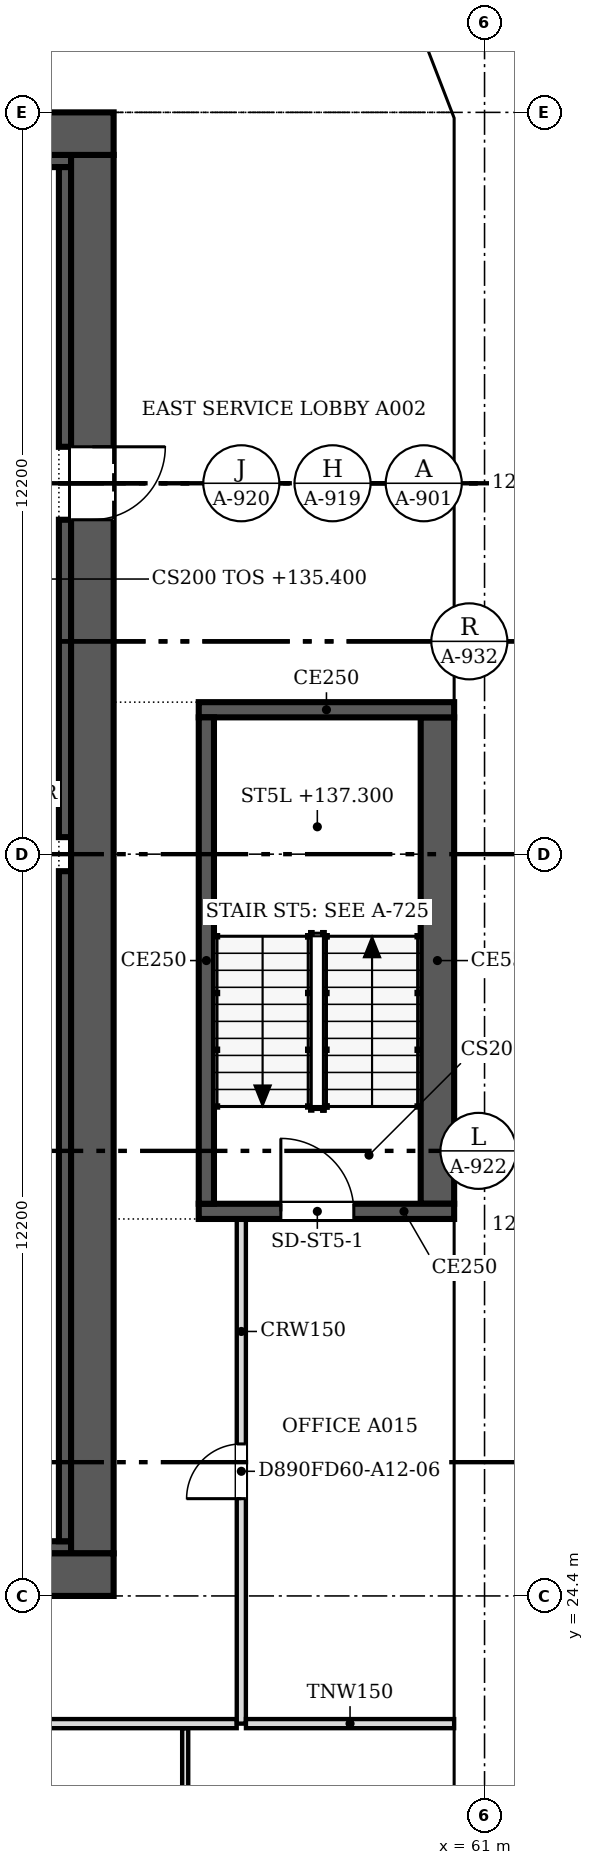
"""IFC4 building model, lengths in metres.
Left out: names, types, materials, properties, quantities, classifications, styles, units other than length and angle.
Written with IfcOpenShell. Run it as: python <this file> out.ifc"""

import sys

from ifc_helpers import new_model, si_unit, direction, frame, frame_2d, origin, place, context, subcontext, project, spatial, polyline, rectangle, outline, extrude, faceted_brep, source, transform, mapped, element, fill, save


model = new_model("IFC4")
c1 = context("Model", 3, precision=1e-05, world=origin(), true_north=direction((0.0, 1.0)))
c2 = subcontext(c1, "Body", "Model", "MODEL_VIEW")
j1 = project(units=[si_unit("LENGTHUNIT", "METRE"), si_unit("PLANEANGLEUNIT", "RADIAN")], contexts=[c1])
p1 = place(None, origin())
s1 = spatial("IfcSite", under=j1, at=p1, CompositionType="ELEMENT")
p2 = place(p1, origin())
s2 = spatial("IfcBuilding", under=s1, at=p2, CompositionType="ELEMENT")
p3 = place(p2, frame((0.0, 0.0, 135.4)))
s3 = spatial("IfcBuildingStorey", under=s2, at=p3, CompositionType="ELEMENT", Elevation=135.4)
m1 = source(origin(), c2, "Body", "Brep", [
    faceted_brep([(3.05, -0.25, 0.0), (6.1, -0.25, 3.8), (6.1, -0.25, 3.8), (3.05, -0.25, 7.6), (0.0, -0.25, 3.8), (0.0, 0.25, 3.8), (3.05, 0.25, 7.6), (6.1, 0.25, 3.8), (6.1, 0.25, 3.8), (3.05, 0.25, 0.0)], [[[0, 1, 2, 3, 4]], [[5, 6, 7, 8, 9]], [[9, 8, 1, 0]], [[7, 6, 3, 2]], [[6, 5, 4, 3]], [[5, 9, 0, 4]], [[1, 8, 7, 2]]]),
])
p4 = place(p3, frame((60.75, 18.3, -3.8), z_axis=(0.0, 0.0, 1.0), x_axis=(0.0, 1.0, 0.0)))
e1 = element("IfcWall", 1, at=p4, inside=s3, PredefinedType="SOLIDWALL", context=c2, shape_type="MappedRepresentation", body=[
    mapped(m1, transform((0.0, 0.0, 0.0), scale=1.0)),
])
m2 = source(origin(), c2, "Body", "SweptSolid", [
    extrude(outline(polyline([(3.05, 0.399), (5.78, 3.8), (3.05, 7.2), (0.321, 3.8), (3.05, 0.399)])), frame((0.0, 0.26, 0.0), z_axis=(0.0, -1.0, 0.0), x_axis=(1.0, 0.0, 0.0)), (0.0, 0.0, 1.0), 0.52),
])
p5 = place(p4, origin())
e2 = element("IfcOpeningElement", 2, at=p5, cuts=e1, PredefinedType="OPENING", context=c2, shape_type="MappedRepresentation", body=[
    mapped(m2, transform((0.0, 0.0, 0.0), scale=1.0)),
])
m3 = source(origin(), c2, "Body", "SweptSolid", [
    extrude(outline(polyline([(3.05, 0.0), (6.1, 3.8), (3.05, 7.6), (0.0, 3.8), (3.05, 0.0)])), frame((0.0, 0.25, 0.0), z_axis=(0.0, -1.0, 0.0), x_axis=(1.0, 0.0, 0.0)), (0.0, 0.0, 1.0), 0.5),
])
p6 = place(p3, frame((60.75, 24.4, -3.8), z_axis=(0.0, 0.0, 1.0), x_axis=(0.0, 1.0, 0.0)))
e3 = element("IfcWall", 3, at=p6, inside=s3, PredefinedType="SOLIDWALL", context=c2, shape_type="MappedRepresentation", body=[
    mapped(m3, transform((0.0, 0.0, 0.0), scale=1.0)),
])
p7 = place(p6, origin())
e4 = element("IfcOpeningElement", 4, at=p7, cuts=e3, PredefinedType="OPENING", context=c2, shape_type="MappedRepresentation", body=[
    mapped(m2, transform((0.0, 0.0, 0.0), scale=1.0)),
])
p8 = place(p3, frame((60.75, 30.5, -3.8), z_axis=(0.0, 0.0, 1.0), x_axis=(0.0, 1.0, 0.0)))
e5 = element("IfcWall", 5, at=p8, inside=s3, PredefinedType="SOLIDWALL", context=c2, shape_type="MappedRepresentation", body=[
    mapped(m3, transform((0.0, 0.0, 0.0), scale=1.0)),
])
p9 = place(p8, origin())
e6 = element("IfcOpeningElement", 6, at=p9, cuts=e5, PredefinedType="OPENING", context=c2, shape_type="MappedRepresentation", body=[
    mapped(m2, transform((0.0, 0.0, 0.0), scale=1.0)),
])
p10 = place(p3, frame((60.75, 36.6, -3.8), z_axis=(0.0, 0.0, 1.0), x_axis=(0.0, 1.0, 0.0)))
e7 = element("IfcWall", 7, at=p10, inside=s3, PredefinedType="SOLIDWALL", context=c2, shape_type="MappedRepresentation", body=[
    mapped(m1, transform((0.0, 0.0, 0.0), scale=1.0)),
])
p11 = place(p10, origin())
e8 = element("IfcOpeningElement", 8, at=p11, cuts=e7, PredefinedType="OPENING", context=c2, shape_type="MappedRepresentation", body=[
    mapped(m2, transform((0.0, 0.0, 0.0), scale=1.0)),
])
m4 = source(origin(), c2, "Body", "Brep", [
    faceted_brep([(3.05, -0.25, 0.0), (6.053, -0.25, 3.8), (3.05, -0.25, 7.6), (0.0, -0.25, 3.8), (0.0, 0.25, 3.8), (3.05, 0.25, 7.6), (6.007, 0.25, 3.859), (6.007, 0.25, 3.741), (3.05, 0.25, 0.0), (6.053, 0.0, 3.8)], [[[0, 1, 2, 3]], [[4, 5, 6, 7, 8]], [[8, 7, 9, 1, 0]], [[6, 5, 2, 1, 9]], [[5, 4, 3, 2]], [[4, 8, 0, 3]], [[9, 7, 6]]]),
])
p12 = place(p3, frame((60.75, 42.7, -3.8), z_axis=(0.0, 0.0, 1.0), x_axis=(0.0, 1.0, 0.0)))
e9 = element("IfcWall", 9, at=p12, inside=s3, PredefinedType="SOLIDWALL", context=c2, shape_type="MappedRepresentation", body=[
    mapped(m4, transform((0.0, 0.0, 0.0), scale=1.0)),
])
m5 = source(origin(), c2, "Body", "SweptSolid", [
    extrude(outline(polyline([(3.049, 0.401), (5.735, 3.8), (3.049, 7.199), (0.321, 3.8), (3.049, 0.401)])), frame((0.0, 0.26, 0.0), z_axis=(0.0, -1.0, 0.0), x_axis=(1.0, 0.0, 0.0)), (0.0, 0.0, 1.0), 0.52),
])
p13 = place(p12, origin())
e10 = element("IfcOpeningElement", 10, at=p13, cuts=e9, PredefinedType="OPENING", context=c2, shape_type="MappedRepresentation", body=[
    mapped(m5, transform((0.0, 0.0, 0.0), scale=1.0)),
])
m6 = source(origin(), c2, "Body", "Brep", [
    faceted_brep([(2.95, -0.25, 0.0), (3.003, -0.25, 0.068), (3.003, -0.25, 7.531), (2.95, -0.25, 7.6), (0.0, -0.25, 3.8), (0.047, 0.25, 3.86), (2.898, 0.25, 7.532), (2.898, 0.25, 0.068), (0.047, 0.25, 3.74), (2.95, 0.0, 0.0), (2.95, 0.0, 7.6), (0.0, 0.0, 3.8)], [[[0, 1, 2, 3, 4]], [[5, 6, 7, 8]], [[1, 0, 9]], [[10, 3, 2]], [[6, 5, 11, 4, 3, 10]], [[8, 7, 9, 0, 4, 11]], [[8, 11, 5]], [[1, 9, 7, 6, 10, 2]]]),
])
p14 = place(p3, frame((60.75, 48.753, -3.8), z_axis=(0.0, 0.0, 1.0), x_axis=(-0.35992665181, 0.932980602862, 0.0)))
e11 = element("IfcWall", 11, at=p14, inside=s3, PredefinedType="SOLIDWALL", context=c2, shape_type="MappedRepresentation", body=[
    mapped(m6, transform((0.0, 0.0, 0.0), scale=1.0)),
])
m7 = source(origin(), c2, "Body", "SweptSolid", [
    extrude(outline(polyline([(2.75, 6.935), (0.316, 3.8), (2.75, 0.665), (2.75, 6.935)])), frame((0.0, 0.26, 0.0), z_axis=(0.0, -1.0, 0.0), x_axis=(1.0, 0.0, 0.0)), (0.0, 0.0, 1.0), 0.52),
])
p15 = place(p14, origin())
e12 = element("IfcOpeningElement", 12, at=p15, cuts=e11, PredefinedType="OPENING", context=c2, shape_type="MappedRepresentation", body=[
    mapped(m7, transform((0.0, 0.0, 0.0), scale=1.0)),
])
p16 = place(p2, frame((0.0, 0.0, 139.2)))
s4 = spatial("IfcBuildingStorey", under=s2, at=p16, CompositionType="ELEMENT", Elevation=139.2)
m8 = source(origin(), c2, "Body", "SweptSolid", [
    extrude(outline(polyline([(3.05, 0.0), (6.1, 3.8), (3.05, 7.6), (0.0, 3.8), (3.05, 0.0)])), frame((0.0, 0.25, 0.0), z_axis=(0.0, -1.0, 0.0), x_axis=(1.0, 0.0, 0.0)), (0.0, 0.0, 1.0), 0.5),
])
p17 = place(p16, frame((60.75, 15.25, -3.8), z_axis=(0.0, 0.0, 1.0), x_axis=(0.0, 1.0, 0.0)))
e13 = element("IfcWall", 13, at=p17, inside=s4, PredefinedType="SOLIDWALL", context=c2, shape_type="MappedRepresentation", body=[
    mapped(m8, transform((0.0, 0.0, 0.0), scale=1.0)),
])
m9 = source(origin(), c2, "Body", "SweptSolid", [
    extrude(outline(polyline([(3.05, 0.399), (5.78, 3.8), (3.05, 7.201), (0.321, 3.8), (3.05, 0.399)])), frame((0.0, 0.26, 0.0), z_axis=(0.0, -1.0, 0.0), x_axis=(1.0, 0.0, 0.0)), (0.0, 0.0, 1.0), 0.52),
])
p18 = place(p17, origin())
e14 = element("IfcOpeningElement", 14, at=p18, cuts=e13, PredefinedType="OPENING", context=c2, shape_type="MappedRepresentation", body=[
    mapped(m9, transform((0.0, 0.0, 0.0), scale=1.0)),
])
m10 = source(origin(), c2, "Body", "Brep", [
    faceted_brep([(3.05, -0.25, 0.0), (6.1, -0.25, 3.8), (6.1, -0.25, 3.8), (3.05, -0.25, 7.6), (0.0, -0.25, 3.8), (0.0, 0.25, 3.8), (3.05, 0.25, 7.6), (6.1, 0.25, 3.8), (6.1, 0.25, 3.8), (3.05, 0.25, 0.0)], [[[0, 1, 2, 3, 4]], [[5, 6, 7, 8, 9]], [[9, 8, 1, 0]], [[7, 6, 3, 2]], [[6, 5, 4, 3]], [[5, 9, 0, 4]], [[1, 8, 7, 2]]]),
])
p19 = place(p16, frame((60.75, 21.35, -3.8), z_axis=(0.0, 0.0, 1.0), x_axis=(0.0, 1.0, 0.0)))
e15 = element("IfcWall", 15, at=p19, inside=s4, PredefinedType="SOLIDWALL", context=c2, shape_type="MappedRepresentation", body=[
    mapped(m10, transform((0.0, 0.0, 0.0), scale=1.0)),
])
p20 = place(p19, origin())
e16 = element("IfcOpeningElement", 16, at=p20, cuts=e15, PredefinedType="OPENING", context=c2, shape_type="MappedRepresentation", body=[
    mapped(m9, transform((0.0, 0.0, 0.0), scale=1.0)),
])
p21 = place(p16, frame((60.75, 27.45, -3.8), z_axis=(0.0, 0.0, 1.0), x_axis=(0.0, 1.0, 0.0)))
e17 = element("IfcWall", 17, at=p21, inside=s4, PredefinedType="SOLIDWALL", context=c2, shape_type="MappedRepresentation", body=[
    mapped(m8, transform((0.0, 0.0, 0.0), scale=1.0)),
])
p22 = place(p21, origin())
e18 = element("IfcOpeningElement", 18, at=p22, cuts=e17, PredefinedType="OPENING", context=c2, shape_type="MappedRepresentation", body=[
    mapped(m9, transform((0.0, 0.0, 0.0), scale=1.0)),
])
p23 = place(p16, frame((60.75, 33.55, -3.8), z_axis=(0.0, 0.0, 1.0), x_axis=(0.0, 1.0, 0.0)))
e19 = element("IfcWall", 19, at=p23, inside=s4, PredefinedType="SOLIDWALL", context=c2, shape_type="MappedRepresentation", body=[
    mapped(m10, transform((0.0, 0.0, 0.0), scale=1.0)),
])
p24 = place(p23, origin())
e20 = element("IfcOpeningElement", 20, at=p24, cuts=e19, PredefinedType="OPENING", context=c2, shape_type="MappedRepresentation", body=[
    mapped(m9, transform((0.0, 0.0, 0.0), scale=1.0)),
])
p25 = place(p16, frame((60.75, 39.65, -3.8), z_axis=(0.0, 0.0, 1.0), x_axis=(0.0, 1.0, 0.0)))
e21 = element("IfcWall", 21, at=p25, inside=s4, PredefinedType="SOLIDWALL", context=c2, shape_type="MappedRepresentation", body=[
    mapped(m8, transform((0.0, 0.0, 0.0), scale=1.0)),
])
p26 = place(p25, origin())
e22 = element("IfcOpeningElement", 22, at=p26, cuts=e21, PredefinedType="OPENING", context=c2, shape_type="MappedRepresentation", body=[
    mapped(m9, transform((0.0, 0.0, 0.0), scale=1.0)),
])
m11 = source(origin(), c2, "Body", "Brep", [
    faceted_brep([(3.003, -0.25, 0.0), (3.05, -0.25, 0.06), (3.05, -0.25, 7.54), (3.003, -0.25, 7.6), (0.0, -0.25, 3.8), (0.0, 0.25, 3.8), (2.957, 0.25, 7.541), (2.957, 0.25, 0.059), (3.003, 0.0, 0.0), (3.003, 0.0, 7.6)], [[[0, 1, 2, 3, 4]], [[5, 6, 7]], [[1, 0, 8]], [[9, 3, 2]], [[6, 5, 4, 3, 9]], [[5, 7, 8, 0, 4]], [[1, 8, 7, 6, 9, 2]]]),
])
p27 = place(p16, frame((60.75, 45.75, -3.8), z_axis=(0.0, 0.0, 1.0), x_axis=(0.0, 1.0, 0.0)))
e23 = element("IfcWall", 23, at=p27, inside=s4, PredefinedType="SOLIDWALL", context=c2, shape_type="MappedRepresentation", body=[
    mapped(m11, transform((0.0, 0.0, 0.0), scale=1.0)),
])
m12 = source(origin(), c2, "Body", "SweptSolid", [
    extrude(outline(polyline([(2.803, 6.944), (0.319, 3.8), (2.803, 0.656), (2.803, 6.944)])), frame((0.0, 0.26, 0.0), z_axis=(0.0, -1.0, 0.0), x_axis=(1.0, 0.0, 0.0)), (0.0, 0.0, 1.0), 0.52),
])
p28 = place(p27, origin())
e24 = element("IfcOpeningElement", 24, at=p28, cuts=e23, PredefinedType="OPENING", context=c2, shape_type="MappedRepresentation", body=[
    mapped(m12, transform((0.0, 0.0, 0.0), scale=1.0)),
])
m13 = source(origin(), c2, "Body", "Brep", [
    faceted_brep([(0.047, -0.25, 0.0), (2.997, -0.25, 3.8), (0.047, -0.25, 7.6), (0.0, -0.25, 7.541), (0.0, -0.25, 0.059), (0.093, 0.25, 7.54), (2.944, 0.25, 3.868), (2.944, 0.25, 3.732), (0.093, 0.25, 0.06), (2.997, 0.0, 3.8), (0.047, 0.0, 0.0), (0.047, 0.0, 7.6)], [[[0, 1, 2, 3, 4]], [[5, 6, 7, 8]], [[8, 7, 9, 1, 0, 10]], [[6, 5, 11, 2, 1, 9]], [[3, 2, 11]], [[10, 0, 4]], [[8, 10, 4, 3, 11, 5]], [[9, 7, 6]]]),
])
p29 = place(p16, frame((60.767, 48.71, -3.8), z_axis=(0.0, 0.0, 1.0), x_axis=(-0.359901446078, 0.932990326376, 0.0)))
e25 = element("IfcWall", 25, at=p29, inside=s4, PredefinedType="SOLIDWALL", context=c2, shape_type="MappedRepresentation", body=[
    mapped(m13, transform((0.0, 0.0, 0.0), scale=1.0)),
])
m14 = source(origin(), c2, "Body", "SweptSolid", [
    extrude(outline(polyline([(0.247, 0.665), (2.681, 3.8), (0.247, 6.935), (0.247, 0.665)])), frame((0.0, 0.26, 0.0), z_axis=(0.0, -1.0, 0.0), x_axis=(1.0, 0.0, 0.0)), (0.0, 0.0, 1.0), 0.52),
])
p30 = place(p29, origin())
e26 = element("IfcOpeningElement", 26, at=p30, cuts=e25, PredefinedType="OPENING", context=c2, shape_type="MappedRepresentation", body=[
    mapped(m14, transform((0.0, 0.0, 0.0), scale=1.0)),
])
p31 = place(p3, frame((54.9, 24.75, 0.0), z_axis=(0.0, 0.0, 1.0), x_axis=(-1.0, 0.0, 0.0)))
e27 = element("IfcWall", 27, at=p31, inside=s3, PredefinedType="SHEAR", context=c2, shape_type="SweptSolid", body=[
    extrude(rectangle(XDim=24.4, YDim=0.7, at=frame_2d((12.2, 0.0))), origin(), (0.0, 0.0, 1.0), 3.8),
])
m15 = source(origin(), c2, "Body", "SweptSolid", [
    extrude(rectangle(XDim=1.2, YDim=2.1, at=frame_2d((0.6, 1.05))), frame((0.0, 0.36, 0.0), z_axis=(0.0, -1.0, 0.0), x_axis=(1.0, 0.0, 0.0)), (0.0, 0.0, 1.0), 0.72),
])
p32 = place(p31, frame((1.5, 0.0, 0.0)))
e28 = element("IfcOpeningElement", 28, at=p32, cuts=e27, PredefinedType="OPENING", context=c2, shape_type="MappedRepresentation", body=[
    mapped(m15, transform((0.0, 0.0, 0.0), scale=1.0)),
])
p33 = place(p3, frame((30.5, 48.45, 0.0), z_axis=(0.0, 0.0, 1.0), x_axis=(1.0, 0.0, 0.0)))
e29 = element("IfcWall", 29, at=p33, inside=s3, PredefinedType="SHEAR", context=c2, shape_type="SweptSolid", body=[
    extrude(rectangle(XDim=24.4, YDim=0.7, at=frame_2d((12.2, 0.0))), origin(), (0.0, 0.0, 1.0), 3.8),
])
p34 = place(p3, frame((54.55, 48.1, 0.0), z_axis=(0.0, 0.0, 1.0), x_axis=(0.0, -1.0, 0.0)))
e30 = element("IfcWall", 30, at=p34, inside=s3, PredefinedType="SHEAR", context=c2, shape_type="SweptSolid", body=[
    extrude(rectangle(XDim=23.0, YDim=0.7, at=frame_2d((11.5, 0.0))), origin(), (0.0, 0.0, 1.0), 3.8),
])
p35 = place(p34, frame((4.8, 0.0, 0.0)))
e31 = element("IfcOpeningElement", 31, at=p35, cuts=e30, PredefinedType="OPENING", context=c2, shape_type="MappedRepresentation", body=[
    mapped(m15, transform((0.0, 0.0, 0.0), scale=1.0)),
])
p36 = place(p3, frame((53.4, 25.2, 0.0), z_axis=(0.0, 0.0, 1.0), x_axis=(1.0, 0.0, 0.0)))
e32 = element("IfcWall", 32, at=p36, inside=s3, PredefinedType="SOLIDWALL", context=c2, shape_type="SweptSolid", body=[
    extrude(rectangle(XDim=0.8, YDim=0.2, at=frame_2d((0.4, 0.0))), origin(), (0.0, 0.0, 1.0), 3.8),
])
p37 = place(p3, frame((31.2, 48.0, 0.0), z_axis=(0.0, 0.0, 1.0), x_axis=(1.0, 0.0, 0.0)))
e33 = element("IfcWall", 33, at=p37, inside=s3, PredefinedType="SOLIDWALL", context=c2, shape_type="SweptSolid", body=[
    extrude(rectangle(XDim=23.0, YDim=0.2, at=frame_2d((11.5, 0.0))), origin(), (0.0, 0.0, 1.0), 3.8),
])
p38 = place(p3, frame((54.1, 25.3, 0.0), z_axis=(0.0, 0.0, 1.0), x_axis=(0.0, 1.0, 0.0)))
e34 = element("IfcWall", 34, at=p38, inside=s3, PredefinedType="SOLIDWALL", context=c2, shape_type="SweptSolid", body=[
    extrude(rectangle(XDim=11.02, YDim=0.2, at=frame_2d((5.51, 0.0))), origin(), (0.0, 0.0, 1.0), 3.8),
])
p39 = place(p3, frame((54.1, 36.88, 0.0), z_axis=(0.0, 0.0, 1.0), x_axis=(0.0, 1.0, 0.0)))
e35 = element("IfcWall", 35, at=p39, inside=s3, PredefinedType="SOLIDWALL", context=c2, shape_type="SweptSolid", body=[
    extrude(rectangle(XDim=5.22, YDim=0.2, at=frame_2d((2.61, 0.0))), origin(), (0.0, 0.0, 1.0), 3.8),
])
p40 = place(p3, frame((54.1, 43.3, 0.0), z_axis=(0.0, 0.0, 1.0), x_axis=(0.0, 1.0, 0.0)))
e36 = element("IfcWall", 36, at=p40, inside=s3, PredefinedType="SOLIDWALL", context=c2, shape_type="SweptSolid", body=[
    extrude(rectangle(XDim=4.6, YDim=0.2, at=frame_2d((2.3, 0.0))), origin(), (0.0, 0.0, 1.0), 3.8),
])
p41 = place(p3, frame((60.5, 30.725, 0.0), z_axis=(0.0, 0.0, 1.0), x_axis=(-1.0, 0.0, 0.0)))
e37 = element("IfcWall", 37, at=p41, inside=s3, PredefinedType="SOLIDWALL", context=c2, shape_type="SweptSolid", body=[
    extrude(rectangle(XDim=4.2, YDim=0.25, at=frame_2d((2.1, 0.0))), origin(), (0.0, 0.0, 1.0), 3.8),
])
m16 = source(origin(), c2, "Body", "SweptSolid", [
    extrude(rectangle(XDim=1.2, YDim=2.1, at=frame_2d((0.6, 1.05))), frame((0.0, 0.135, 0.0), z_axis=(0.0, -1.0, 0.0), x_axis=(1.0, 0.0, 0.0)), (0.0, 0.0, 1.0), 0.27),
])
p42 = place(p41, frame((1.65, 0.0, 0.0)))
e38 = element("IfcOpeningElement", 38, at=p42, cuts=e37, PredefinedType="OPENING", context=c2, shape_type="MappedRepresentation", body=[
    mapped(m16, transform((0.0, 0.0, 0.0), scale=1.0)),
])
p43 = place(p3, frame((56.425, 30.85, 0.0), z_axis=(0.0, 0.0, 1.0), x_axis=(0.0, 1.0, 0.0)))
e39 = element("IfcWall", 39, at=p43, inside=s3, PredefinedType="SOLIDWALL", context=c2, shape_type="SweptSolid", body=[
    extrude(rectangle(XDim=8.0, YDim=0.25, at=frame_2d((4.0, 0.0))), origin(), (0.0, 0.0, 1.0), 3.8),
])
p44 = place(p3, frame((56.3, 38.975, 0.0), z_axis=(0.0, 0.0, 1.0), x_axis=(1.0, 0.0, 0.0)))
e40 = element("IfcWall", 40, at=p44, inside=s3, PredefinedType="SOLIDWALL", context=c2, shape_type="SweptSolid", body=[
    extrude(rectangle(XDim=4.2, YDim=0.25, at=frame_2d((2.1, 0.0))), origin(), (0.0, 0.0, 1.0), 3.8),
])
p45 = place(p3, frame((60.225, 38.85, 0.0), z_axis=(0.0, 0.0, 1.0), x_axis=(0.0, -1.0, 0.0)))
e41 = element("IfcWall", 41, at=p45, inside=s3, PredefinedType="SOLIDWALL", context=c2, shape_type="SweptSolid", body=[
    extrude(rectangle(XDim=8.0, YDim=0.55, at=frame_2d((4.0, 0.0))), origin(), (0.0, 0.0, 1.0), 3.8),
])
p46 = place(p3, frame((56.077, 22.224, 0.0), z_axis=(0.0, 0.0, 1.0), x_axis=(0.0, -1.0, 0.0)))
e42 = element("IfcWall", 42, at=p46, inside=s3, PredefinedType="PARTITIONING", context=c2, shape_type="SweptSolid", body=[
    extrude(rectangle(XDim=5.048, YDim=0.1, at=frame_2d((2.524, 0.0))), origin(), (0.0, 0.0, 1.0), 3.067),
])
m17 = source(origin(), c2, "Body", "SweptSolid", [
    extrude(rectangle(XDim=0.9, YDim=2.1, at=frame_2d((0.45, 1.05))), frame((0.0, 0.06, 0.0), z_axis=(0.0, -1.0, 0.0), x_axis=(1.0, 0.0, 0.0)), (0.0, 0.0, 1.0), 0.12),
])
p47 = place(p46, frame((2.048, 0.0, 0.0)))
e43 = element("IfcOpeningElement", 43, at=p47, cuts=e42, PredefinedType="OPENING", context=c2, shape_type="MappedRepresentation", body=[
    mapped(m17, transform((0.0, 0.0, 0.0), scale=1.0)),
])
p48 = place(p3, frame((47.476, 22.3, 0.0), z_axis=(0.0, 0.0, 1.0), x_axis=(1.0, 0.0, 0.0)))
e44 = element("IfcWall", 44, at=p48, inside=s3, PredefinedType="PARTITIONING", context=c2, shape_type="SweptSolid", body=[
    extrude(rectangle(XDim=9.448, YDim=0.15, at=frame_2d((4.724, 0.0))), origin(), (0.0, 0.0, 1.0), 3.067),
])
p49 = place(p3, frame((57.0, 30.6, 0.0), z_axis=(0.0, 0.0, 1.0), x_axis=(0.0, -1.0, 0.0)))
e45 = element("IfcWall", 45, at=p49, inside=s3, PredefinedType="PARTITIONING", context=c2, shape_type="SweptSolid", body=[
    extrude(rectangle(XDim=8.3, YDim=0.15, at=frame_2d((4.15, 0.0))), origin(), (0.0, 0.0, 1.0), 3.067),
])
m18 = source(origin(), c2, "Body", "SweptSolid", [
    extrude(rectangle(XDim=0.9, YDim=2.1, at=frame_2d((0.45, 1.05))), frame((0.0, 0.085, 0.0), z_axis=(0.0, -1.0, 0.0), x_axis=(1.0, 0.0, 0.0)), (0.0, 0.0, 1.0), 0.17),
])
p50 = place(p49, frame((3.7, 0.0, 0.0)))
e46 = element("IfcOpeningElement", 46, at=p50, cuts=e45, PredefinedType="OPENING", context=c2, shape_type="MappedRepresentation", body=[
    mapped(m18, transform((0.0, 0.0, 0.0), scale=1.0)),
])
p51 = place(p3, frame((57.076, 22.3, 0.0), z_axis=(0.0, 0.0, 1.0), x_axis=(1.0, 0.0, 0.0)))
e47 = element("IfcWall", 47, at=p51, inside=s3, PredefinedType="PARTITIONING", context=c2, shape_type="SweptSolid", body=[
    extrude(rectangle(XDim=3.424, YDim=0.15, at=frame_2d((1.712, 0.0))), origin(), (0.0, 0.0, 1.0), 3.067),
])
m19 = source(origin(), c2, "Body", "SweptSolid", [
    extrude(rectangle(XDim=1.2, YDim=2.1, at=frame_2d((0.6, 1.05))), frame((0.0, 0.025, 0.0), z_axis=(0.0, -1.0, 0.0), x_axis=(1.0, 0.0, 0.0)), (0.0, 0.0, 1.0), 0.05),
])
p52 = place(p35, origin())
e48 = element("IfcDoor", 48, at=p52, inside=s3, OperationType="SINGLE_SWING_LEFT", PredefinedType="DOOR", context=c2, shape_type="MappedRepresentation", body=[
    mapped(m19, transform((0.0, 0.0, 0.0), scale=1.0)),
])
fill(e31, e48)
p53 = place(p42, origin())
e49 = element("IfcDoor", 49, at=p53, inside=s3, OperationType="SINGLE_SWING_RIGHT", PredefinedType="DOOR", context=c2, shape_type="MappedRepresentation", body=[
    mapped(m19, transform((0.0, 0.0, 0.0), scale=1.0)),
])
fill(e38, e49)
m20 = source(origin(), c2, "Body", "SweptSolid", [
    extrude(rectangle(XDim=0.9, YDim=2.1, at=frame_2d((0.45, 1.05))), frame((0.0, 0.025, 0.0), z_axis=(0.0, -1.0, 0.0), x_axis=(1.0, 0.0, 0.0)), (0.0, 0.0, 1.0), 0.05),
])
p54 = place(p50, origin())
e50 = element("IfcDoor", 50, at=p54, inside=s3, OperationType="SINGLE_SWING_RIGHT", PredefinedType="DOOR", context=c2, shape_type="MappedRepresentation", body=[
    mapped(m20, transform((0.0, 0.0, 0.0), scale=1.0)),
])
fill(e46, e50)
save(model, sys.argv[1])
